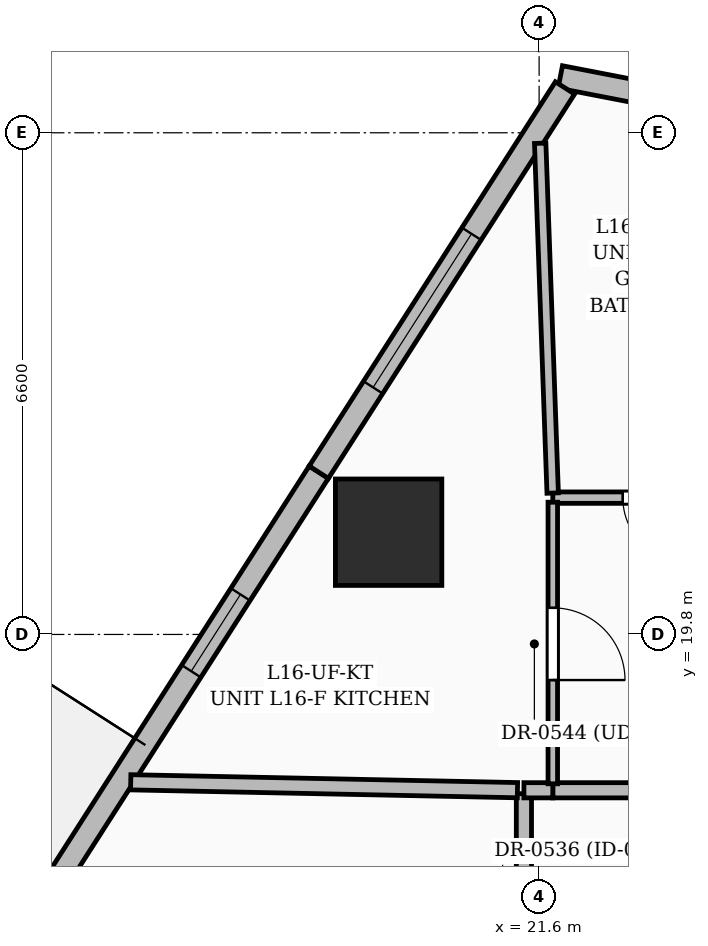
"""IFC4 building model, lengths in metres.
Left out: names, types, materials, properties, quantities, classifications, styles, units other than length and angle.
Written with IfcOpenShell. Run it as: python <this file> out.ifc"""

import sys

from ifc_helpers import new_model, si_unit, direction, frame, frame_2d, origin, origin_2d, place, context, subcontext, project, spatial, rectangle, extrude, element, fill, save


model = new_model("IFC4")
c1 = context("Model", 3, precision=1e-05, world=origin(), true_north=direction((0.0, 1.0)))
c2 = subcontext(c1, "Body", "Model", "MODEL_VIEW")
j1 = project(units=[si_unit("LENGTHUNIT", "METRE"), si_unit("PLANEANGLEUNIT", "RADIAN")], contexts=[c1])
p1 = place(None, origin())
s1 = spatial("IfcSite", under=j1, at=p1, CompositionType="ELEMENT")
p2 = place(p1, origin())
s2 = spatial("IfcBuilding", under=s1, at=p2, CompositionType="ELEMENT")
p3 = place(p2, frame((0.0, 0.0, 67.8)))
s3 = spatial("IfcBuildingStorey", under=s2, at=p3, CompositionType="ELEMENT", Elevation=67.8)
p4 = place(p3, frame((19.62, 21.145, 0.0), z_axis=(0.0, 0.0, 1.0), x_axis=(1.0, 0.0, 0.0)))
e1 = element("IfcColumn", 1, at=p4, inside=s3, PredefinedType="COLUMN", context=c2, shape_type="SweptSolid", body=[
    extrude(rectangle(XDim=1.4, YDim=1.4, at=origin_2d()), origin(), (0.0, 0.0, 1.0), 3.6),
])
p5 = place(p3, frame((21.879, 27.135, 0.0), z_axis=(0.0, 0.0, 1.0), x_axis=(0.981760587394, -0.190121406053, 0.0)))
e2 = element("IfcWall", 2, at=p5, inside=s3, PredefinedType="SOLIDWALL", context=c2, shape_type="SweptSolid", body=[
    extrude(rectangle(XDim=2.594, YDim=0.3, at=frame_2d((1.297, 0.0))), origin(), (0.0, 0.0, 1.0), 2.375),
])
p6 = place(p3, frame((15.311, 16.643, 0.0), z_axis=(0.0, 0.0, 1.0), x_axis=(0.539502306827, 0.841984121542, 0.0)))
e3 = element("IfcWall", 3, at=p6, inside=s3, PredefinedType="SOLIDWALL", context=c2, shape_type="SweptSolid", body=[
    extrude(rectangle(XDim=6.284, YDim=0.3, at=frame_2d((3.142, 0.0))), origin(), (0.0, 0.0, 1.0), 3.35),
])
p7 = place(p6, frame((3.175, 0.0, 0.8)))
e4 = element("IfcOpeningElement", 4, at=p7, cuts=e3, PredefinedType="OPENING", context=c2, shape_type="SweptSolid", body=[
    extrude(rectangle(XDim=1.2, YDim=1.8, at=frame_2d((0.6, 0.9))), frame((0.0, 0.16, 0.0), z_axis=(0.0, -1.0, 0.0), x_axis=(1.0, 0.0, 0.0)), (0.0, 0.0, 1.0), 0.32),
])
p8 = place(p3, frame((18.701, 21.934, 0.0), z_axis=(0.0, 0.0, 1.0), x_axis=(0.539511671319, 0.841978121159, 0.0)))
e5 = element("IfcWall", 5, at=p8, inside=s3, PredefinedType="SOLIDWALL", context=c2, shape_type="SweptSolid", body=[
    extrude(rectangle(XDim=6.004, YDim=0.3, at=frame_2d((3.002, 0.0))), origin(), (0.0, 0.0, 1.0), 3.35),
])
p9 = place(p8, frame((1.325, 0.0, 0.6)))
e6 = element("IfcOpeningElement", 6, at=p9, cuts=e5, PredefinedType="OPENING", context=c2, shape_type="SweptSolid", body=[
    extrude(rectangle(XDim=2.4, YDim=2.1, at=frame_2d((1.2, 1.05))), frame((0.0, 0.16, 0.0), z_axis=(0.0, -1.0, 0.0), x_axis=(1.0, 0.0, 0.0)), (0.0, 0.0, 1.0), 0.32),
])
p10 = place(p3, frame((21.4, 17.705, 0.0), z_axis=(0.0, 0.0, 1.0), x_axis=(0.0, -1.0, 0.0)))
e7 = element("IfcWall", 7, at=p10, inside=s3, PredefinedType="PARTITIONING", context=c2, shape_type="SweptSolid", body=[
    extrude(rectangle(XDim=4.955, YDim=0.2, at=frame_2d((2.478, 0.0))), origin(), (0.0, 0.0, 1.0), 2.787),
])
p11 = place(p10, frame((1.597, 0.0, 0.0)))
e8 = element("IfcOpeningElement", 8, at=p11, cuts=e7, PredefinedType="OPENING", context=c2, shape_type="SweptSolid", body=[
    extrude(rectangle(XDim=1.6, YDim=2.3, at=frame_2d((0.8, 1.15))), frame((0.0, 0.11, 0.0), z_axis=(0.0, -1.0, 0.0), x_axis=(1.0, 0.0, 0.0)), (0.0, 0.0, 1.0), 0.22),
])
p12 = place(p3, frame((26.93, 17.75, 0.0), z_axis=(0.0, 0.0, 1.0), x_axis=(-1.0, 0.0, 0.0)))
e9 = element("IfcWall", 9, at=p12, inside=s3, PredefinedType="PARTITIONING", context=c2, shape_type="SweptSolid", body=[
    extrude(rectangle(XDim=5.15, YDim=0.2, at=frame_2d((2.575, 0.0))), origin(), (0.0, 0.0, 1.0), 2.279),
])
p13 = place(p12, frame((2.016, 0.0, 0.0)))
e10 = element("IfcOpeningElement", 10, at=p13, cuts=e9, PredefinedType="OPENING", context=c2, shape_type="SweptSolid", body=[
    extrude(rectangle(XDim=1.0, YDim=2.2, at=frame_2d((0.5, 1.1))), frame((0.0, 0.11, 0.0), z_axis=(0.0, -1.0, 0.0), x_axis=(1.0, 0.0, 0.0)), (0.0, 0.0, 1.0), 0.22),
])
p14 = place(p3, frame((21.78, 17.75, 0.0), z_axis=(0.0, 0.0, 1.0), x_axis=(-1.0, 0.0, 0.0)))
e11 = element("IfcWall", 11, at=p14, inside=s3, PredefinedType="PARTITIONING", context=c2, shape_type="SweptSolid", body=[
    extrude(rectangle(XDim=0.38, YDim=0.2, at=frame_2d((0.19, 0.0))), origin(), (0.0, 0.0, 1.0), 3.35),
])
p15 = place(p3, frame((21.315, 17.751, 0.0), z_axis=(0.0, 0.0, 1.0), x_axis=(-0.999792117948, 0.020389234651, 0.0)))
e12 = element("IfcWall", 12, at=p15, inside=s3, PredefinedType="PARTITIONING", context=c2, shape_type="SweptSolid", body=[
    extrude(rectangle(XDim=5.089, YDim=0.2, at=frame_2d((2.544, 0.0))), origin(), (0.0, 0.0, 1.0), 2.37),
])
p16 = place(p3, frame((24.36, 21.6, 0.0), z_axis=(0.0, 0.0, 1.0), x_axis=(-1.0, 0.0, 0.0)))
e13 = element("IfcWall", 13, at=p16, inside=s3, PredefinedType="PARTITIONING", context=c2, shape_type="SweptSolid", body=[
    extrude(rectangle(XDim=2.58, YDim=0.15, at=frame_2d((1.29, 0.0))), origin(), (0.0, 0.0, 1.0), 2.787),
])
p17 = place(p16, frame((0.809, 0.0, 0.0)))
e14 = element("IfcOpeningElement", 14, at=p17, cuts=e13, PredefinedType="OPENING", context=c2, shape_type="SweptSolid", body=[
    extrude(rectangle(XDim=0.85, YDim=2.1, at=frame_2d((0.425, 1.05))), frame((0.0, 0.085, 0.0), z_axis=(0.0, -1.0, 0.0), x_axis=(1.0, 0.0, 0.0)), (0.0, 0.0, 1.0), 0.17),
])
p18 = place(p3, frame((21.78, 21.54, 0.0), z_axis=(0.0, 0.0, 1.0), x_axis=(0.0, -1.0, 0.0)))
e15 = element("IfcWall", 15, at=p18, inside=s3, PredefinedType="PARTITIONING", context=c2, shape_type="SweptSolid", body=[
    extrude(rectangle(XDim=3.705, YDim=0.125, at=frame_2d((1.853, 0.0))), origin(), (0.0, 0.0, 1.0), 2.279),
])
p19 = place(p18, frame((1.39, 0.0, 0.0)))
e16 = element("IfcOpeningElement", 16, at=p19, cuts=e15, PredefinedType="OPENING", context=c2, shape_type="SweptSolid", body=[
    extrude(rectangle(XDim=0.95, YDim=2.2, at=frame_2d((0.475, 1.1))), frame((0.0, 0.072, 0.0), z_axis=(0.0, -1.0, 0.0), x_axis=(1.0, 0.0, 0.0)), (0.0, 0.0, 1.0), 0.145),
])
p20 = place(p3, frame((21.614, 26.262, 0.0), z_axis=(0.0, 0.0, 1.0), x_axis=(0.035733133252, -0.999361367668, 0.0)))
e17 = element("IfcWall", 17, at=p20, inside=s3, PredefinedType="PARTITIONING", context=c2, shape_type="SweptSolid", body=[
    extrude(rectangle(XDim=4.605, YDim=0.15, at=frame_2d((2.302, 0.0))), origin(), (0.0, 0.0, 1.0), 2.37),
])
p21 = place(p7, origin())
e18 = element("IfcWindow", 18, at=p21, inside=s3, PartitioningType="SINGLE_PANEL", PredefinedType="WINDOW", context=c2, shape_type="SweptSolid", body=[
    extrude(rectangle(XDim=1.2, YDim=1.8, at=frame_2d((0.6, 0.9))), frame((0.0, 0.03, 0.0), z_axis=(0.0, -1.0, 0.0), x_axis=(1.0, 0.0, 0.0)), (0.0, 0.0, 1.0), 0.06),
])
fill(e4, e18)
p22 = place(p9, origin())
e19 = element("IfcWindow", 19, at=p22, inside=s3, PartitioningType="SINGLE_PANEL", PredefinedType="WINDOW", context=c2, shape_type="SweptSolid", body=[
    extrude(rectangle(XDim=2.4, YDim=2.1, at=frame_2d((1.2, 1.05))), frame((0.0, 0.03, 0.0), z_axis=(0.0, -1.0, 0.0), x_axis=(1.0, 0.0, 0.0)), (0.0, 0.0, 1.0), 0.06),
])
fill(e6, e19)
p23 = place(p19, origin())
e20 = element("IfcDoor", 20, at=p23, inside=s3, OperationType="SINGLE_SWING_RIGHT", PredefinedType="DOOR", context=c2, shape_type="SweptSolid", body=[
    extrude(rectangle(XDim=0.95, YDim=2.2, at=frame_2d((0.475, 1.1))), frame((0.0, 0.025, 0.0), z_axis=(0.0, -1.0, 0.0), x_axis=(1.0, 0.0, 0.0)), (0.0, 0.0, 1.0), 0.05),
])
fill(e16, e20)
p24 = place(p17, origin())
e21 = element("IfcDoor", 21, at=p24, inside=s3, OperationType="SINGLE_SWING_LEFT", PredefinedType="DOOR", context=c2, shape_type="SweptSolid", body=[
    extrude(rectangle(XDim=0.85, YDim=2.1, at=frame_2d((0.425, 1.05))), frame((0.0, 0.025, 0.0), z_axis=(0.0, -1.0, 0.0), x_axis=(1.0, 0.0, 0.0)), (0.0, 0.0, 1.0), 0.05),
])
fill(e14, e21)
save(model, sys.argv[1])
